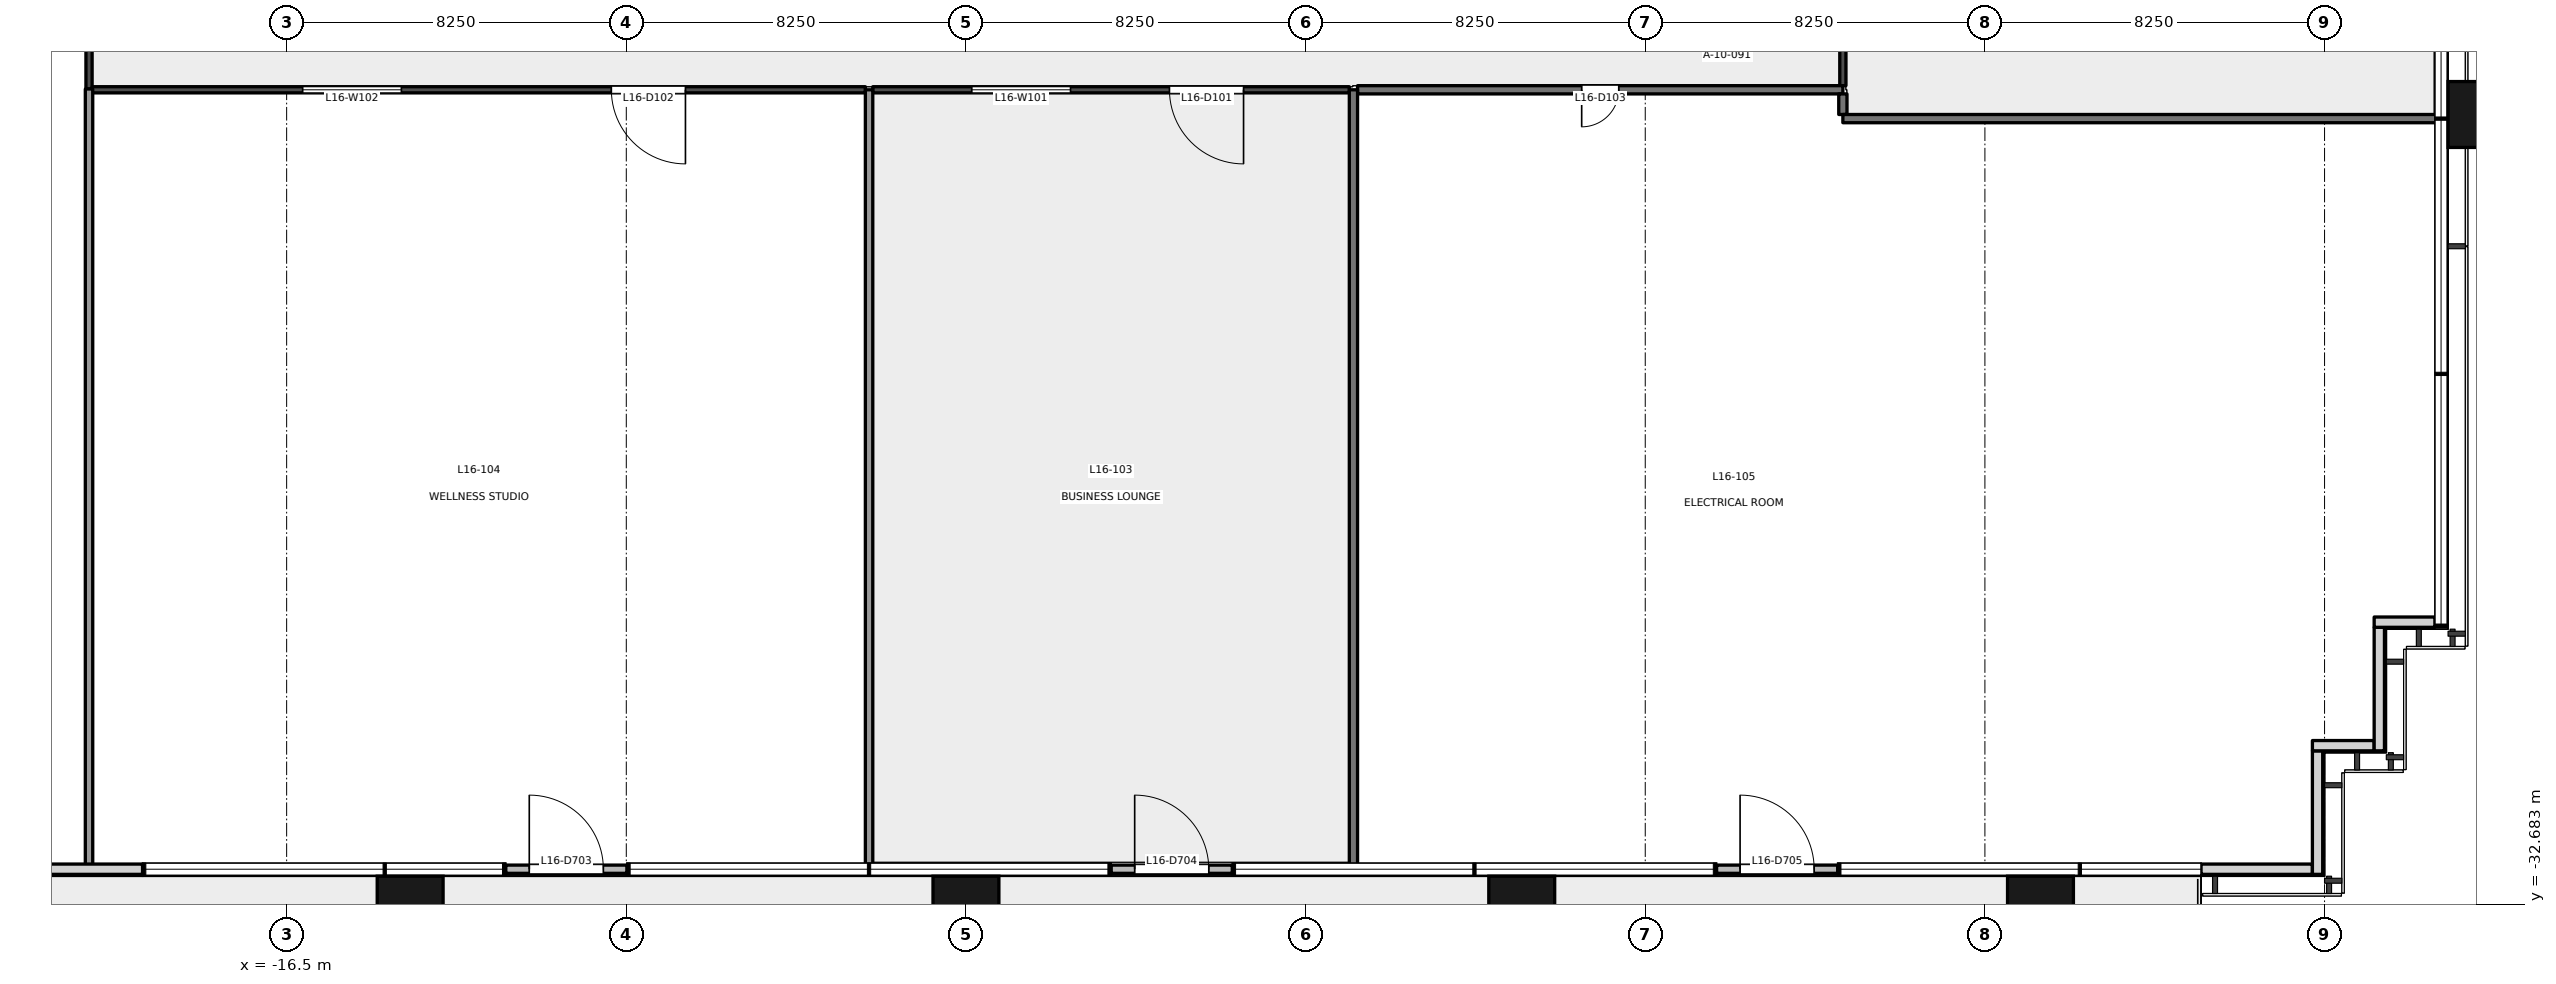
"""IFC4 building model, lengths in metres.
Left out: names, types, materials, properties, quantities, classifications, styles, units other than length and angle.
Written with IfcOpenShell. Run it as: python <this file> out.ifc"""

import sys

from ifc_helpers import new_model, si_unit, direction, frame, frame_2d, origin, origin_2d, place, context, subcontext, project, spatial, rectangle, extrude, element, fill, save


model = new_model("IFC4")
c1 = context("Model", 3, precision=1e-05, world=origin(), true_north=direction((0.0, 1.0)))
c2 = subcontext(c1, "Body", "Model", "MODEL_VIEW")
j1 = project(units=[si_unit("LENGTHUNIT", "METRE"), si_unit("PLANEANGLEUNIT", "RADIAN")], contexts=[c1])
p1 = place(None, origin())
s1 = spatial("IfcSite", under=j1, at=p1, CompositionType="ELEMENT")
p2 = place(p1, origin())
s2 = spatial("IfcBuilding", under=s1, at=p2, CompositionType="ELEMENT")
p3 = place(p2, frame((0.0, 0.0, 74.3)))
s3 = spatial("IfcBuildingStorey", under=s2, at=p3, CompositionType="ELEMENT", Elevation=74.3)
for number, where, z_axis, x_axis in (
    (1, (-13.5, -32.9, -0.2), (0.0, 0.0, 1.0), (1.0, 0.0, 0.0)),
    (2, (0.0, -32.9, -0.2), (0.0, 0.0, 1.0), (1.0, 0.0, 0.0)),
    (3, (13.5, -32.9, -0.2), (0.0, 0.0, 1.0), (1.0, 0.0, 0.0)),
    (4, (26.1, -32.9, -0.2), (0.0, 0.0, 1.0), (1.0, 0.0, 0.0)),
    (5, (36.9, -13.5, -0.2), (0.0, 0.0, 1.0), (0.0, 1.0, 0.0)),
):
    element("IfcColumn", number, at=place(p3, frame(where, z_axis=z_axis, x_axis=x_axis)), inside=s3, PredefinedType="COLUMN", context=c2, shape_type="SweptSolid", body=[
        extrude(rectangle(XDim=1.6, YDim=1.8, at=origin_2d()), origin(), (0.0, 0.0, 1.0), 5.4),
    ])
p4 = place(p3, frame((30.0, -31.83, 0.0), z_axis=(0.0, 0.0, 1.0), x_axis=(1.0, 0.0, 0.0)))
e6 = element("IfcWall", 6, at=p4, inside=s3, PredefinedType="SOLIDWALL", context=c2, shape_type="SweptSolid", body=[
    extrude(rectangle(XDim=2.705, YDim=0.25, at=frame_2d((1.353, 0.0))), origin(), (0.0, 0.0, 1.0), 5.2),
])
p5 = place(p3, frame((32.83, -31.955, 0.0), z_axis=(0.0, 0.0, 1.0), x_axis=(0.0, 1.0, 0.0)))
e7 = element("IfcWall", 7, at=p5, inside=s3, PredefinedType="SOLIDWALL", context=c2, shape_type="SweptSolid", body=[
    extrude(rectangle(XDim=3.0, YDim=0.25, at=frame_2d((1.5, 0.0))), origin(), (0.0, 0.0, 1.0), 5.2),
])
p6 = place(p3, frame((32.705, -28.83, 0.0), z_axis=(0.0, 0.0, 1.0), x_axis=(1.0, 0.0, 0.0)))
e8 = element("IfcWall", 8, at=p6, inside=s3, PredefinedType="SOLIDWALL", context=c2, shape_type="SweptSolid", body=[
    extrude(rectangle(XDim=1.5, YDim=0.25, at=frame_2d((0.75, 0.0))), origin(), (0.0, 0.0, 1.0), 5.2),
])
p7 = place(p3, frame((34.33, -28.955, 0.0), z_axis=(0.0, 0.0, 1.0), x_axis=(0.0, 1.0, 0.0)))
e9 = element("IfcWall", 9, at=p7, inside=s3, PredefinedType="SOLIDWALL", context=c2, shape_type="SweptSolid", body=[
    extrude(rectangle(XDim=3.0, YDim=0.25, at=frame_2d((1.5, 0.0))), origin(), (0.0, 0.0, 1.0), 5.2),
])
p8 = place(p3, frame((34.205, -25.83, 0.0), z_axis=(0.0, 0.0, 1.0), x_axis=(1.0, 0.0, 0.0)))
e10 = element("IfcWall", 10, at=p8, inside=s3, PredefinedType="SOLIDWALL", context=c2, shape_type="SweptSolid", body=[
    extrude(rectangle(XDim=1.475, YDim=0.25, at=frame_2d((0.737, 0.0))), origin(), (0.0, 0.0, 1.0), 5.2),
])
p9 = place(p3, frame((-22.955, -31.83, 0.0), z_axis=(0.0, 0.0, 1.0), x_axis=(1.0, 0.0, 0.0)))
e11 = element("IfcWall", 11, at=p9, inside=s3, PredefinedType="SOLIDWALL", context=c2, shape_type="SweptSolid", body=[
    extrude(rectangle(XDim=2.955, YDim=0.25, at=frame_2d((1.478, 0.0))), origin(), (0.0, 0.0, 1.0), 5.2),
])
p10 = place(p3, frame((-11.177, -31.83, 0.0), z_axis=(0.0, 0.0, 1.0), x_axis=(1.0, 0.0, 0.0)))
e12 = element("IfcWall", 12, at=p10, inside=s3, PredefinedType="SOLIDWALL", context=c2, shape_type="SweptSolid", body=[
    extrude(rectangle(XDim=2.941, YDim=0.2, at=frame_2d((1.47, 0.0))), origin(), (0.0, 0.0, 1.0), 4.1),
])
p11 = place(p10, frame((0.571, 0.0, 0.0)))
e13 = element("IfcOpeningElement", 13, at=p11, cuts=e12, PredefinedType="OPENING", context=c2, shape_type="SweptSolid", body=[
    extrude(rectangle(XDim=1.8, YDim=2.4, at=frame_2d((0.9, 1.2))), frame((0.0, 0.111, 0.0), z_axis=(0.0, -1.0, 0.0), x_axis=(1.0, 0.0, 0.0)), (0.0, 0.0, 1.0), 0.221),
])
p12 = place(p3, frame((3.528, -31.83, 0.0), z_axis=(0.0, 0.0, 1.0), x_axis=(1.0, 0.0, 0.0)))
e14 = element("IfcWall", 14, at=p12, inside=s3, PredefinedType="SOLIDWALL", context=c2, shape_type="SweptSolid", body=[
    extrude(rectangle(XDim=2.941, YDim=0.2, at=frame_2d((1.47, 0.0))), origin(), (0.0, 0.0, 1.0), 4.1),
])
p13 = place(p12, frame((0.571, 0.0, 0.0)))
e15 = element("IfcOpeningElement", 15, at=p13, cuts=e14, PredefinedType="OPENING", context=c2, shape_type="SweptSolid", body=[
    extrude(rectangle(XDim=1.8, YDim=2.4, at=frame_2d((0.9, 1.2))), frame((0.0, 0.111, 0.0), z_axis=(0.0, -1.0, 0.0), x_axis=(1.0, 0.0, 0.0)), (0.0, 0.0, 1.0), 0.221),
])
p14 = place(p3, frame((18.233, -31.83, 0.0), z_axis=(0.0, 0.0, 1.0), x_axis=(1.0, 0.0, 0.0)))
e16 = element("IfcWall", 16, at=p14, inside=s3, PredefinedType="SOLIDWALL", context=c2, shape_type="SweptSolid", body=[
    extrude(rectangle(XDim=2.941, YDim=0.2, at=frame_2d((1.471, 0.0))), origin(), (0.0, 0.0, 1.0), 4.1),
])
p15 = place(p14, frame((0.571, 0.0, 0.0)))
e17 = element("IfcOpeningElement", 17, at=p15, cuts=e16, PredefinedType="OPENING", context=c2, shape_type="SweptSolid", body=[
    extrude(rectangle(XDim=1.8, YDim=2.4, at=frame_2d((0.9, 1.2))), frame((0.0, 0.111, 0.0), z_axis=(0.0, -1.0, 0.0), x_axis=(1.0, 0.0, 0.0)), (0.0, 0.0, 1.0), 0.221),
])
p16 = place(p3, frame((-21.3, -12.88, 0.0), z_axis=(0.0, 0.0, 1.0), x_axis=(0.0, 1.0, 0.0)))
e18 = element("IfcWall", 18, at=p16, inside=s3, PredefinedType="PARTITIONING", context=c2, shape_type="SweptSolid", body=[
    extrude(rectangle(XDim=23.62, YDim=0.15, at=frame_2d((11.81, 0.0))), origin(), (0.0, 0.0, 1.0), 4.8),
])
p17 = place(p16, frame((16.24, 0.0, 0.0)))
e19 = element("IfcOpeningElement", 19, at=p17, cuts=e18, PredefinedType="OPENING", context=c2, shape_type="SweptSolid", body=[
    extrude(rectangle(XDim=1.8, YDim=2.1, at=frame_2d((0.9, 1.05))), frame((0.0, 0.085, 0.0), z_axis=(0.0, -1.0, 0.0), x_axis=(1.0, 0.0, 0.0)), (0.0, 0.0, 1.0), 0.171),
])
p18 = place(p16, frame((6.948, 0.0, 0.0)))
e20 = element("IfcOpeningElement", 20, at=p18, cuts=e18, PredefinedType="OPENING", context=c2, shape_type="SweptSolid", body=[
    extrude(rectangle(XDim=2.4, YDim=2.4, at=frame_2d((1.2, 1.2))), frame((0.0, 0.085, 0.0), z_axis=(0.0, -1.0, 0.0), x_axis=(1.0, 0.0, 0.0)), (0.0, 0.0, 1.0), 0.171),
])
p19 = place(p3, frame((9.312, -12.9, 0.0), z_axis=(0.0, 0.0, 1.0), x_axis=(-1.0, 0.0, 0.0)))
e21 = element("IfcWall", 21, at=p19, inside=s3, PredefinedType="PARTITIONING", context=c2, shape_type="SweptSolid", body=[
    extrude(rectangle(XDim=11.575, YDim=0.15, at=frame_2d((5.788, 0.0))), origin(), (0.0, 0.0, 1.0), 4.2),
])
p20 = place(p19, frame((2.569, 0.0, 0.0)))
e22 = element("IfcOpeningElement", 22, at=p20, cuts=e21, PredefinedType="OPENING", context=c2, shape_type="SweptSolid", body=[
    extrude(rectangle(XDim=1.8, YDim=2.1, at=frame_2d((0.9, 1.05))), frame((0.0, 0.085, 0.0), z_axis=(0.0, -1.0, 0.0), x_axis=(1.0, 0.0, 0.0)), (0.0, 0.0, 1.0), 0.171),
])
p21 = place(p19, frame((6.772, 0.0, 0.0)))
e23 = element("IfcOpeningElement", 23, at=p21, cuts=e21, PredefinedType="OPENING", context=c2, shape_type="SweptSolid", body=[
    extrude(rectangle(XDim=2.4, YDim=2.4, at=frame_2d((1.2, 1.2))), frame((0.0, 0.085, 0.0), z_axis=(0.0, -1.0, 0.0), x_axis=(1.0, 0.0, 0.0)), (0.0, 0.0, 1.0), 0.171),
])
p22 = place(p3, frame((-2.443, -12.9, 0.0), z_axis=(0.0, 0.0, 1.0), x_axis=(-1.0, 0.0, 0.0)))
e24 = element("IfcWall", 24, at=p22, inside=s3, PredefinedType="PARTITIONING", context=c2, shape_type="SweptSolid", body=[
    extrude(rectangle(XDim=18.782, YDim=0.15, at=frame_2d((9.391, 0.0))), origin(), (0.0, 0.0, 1.0), 4.2),
])
p23 = place(p22, frame((4.37, 0.0, 0.0)))
e25 = element("IfcOpeningElement", 25, at=p23, cuts=e24, PredefinedType="OPENING", context=c2, shape_type="SweptSolid", body=[
    extrude(rectangle(XDim=1.8, YDim=2.1, at=frame_2d((0.9, 1.05))), frame((0.0, 0.085, 0.0), z_axis=(0.0, -1.0, 0.0), x_axis=(1.0, 0.0, 0.0)), (0.0, 0.0, 1.0), 0.171),
])
p24 = place(p22, frame((11.269, 0.0, 0.0)))
e26 = element("IfcOpeningElement", 26, at=p24, cuts=e24, PredefinedType="OPENING", context=c2, shape_type="SweptSolid", body=[
    extrude(rectangle(XDim=2.4, YDim=2.4, at=frame_2d((1.2, 1.2))), frame((0.0, 0.085, 0.0), z_axis=(0.0, -1.0, 0.0), x_axis=(1.0, 0.0, 0.0)), (0.0, 0.0, 1.0), 0.171),
])
p25 = place(p3, frame((21.3, -12.9, 0.0), z_axis=(0.0, 0.0, 1.0), x_axis=(-1.0, 0.0, 0.0)))
e27 = element("IfcWall", 27, at=p25, inside=s3, PredefinedType="PARTITIONING", context=c2, shape_type="SweptSolid", body=[
    extrude(rectangle(XDim=11.788, YDim=0.2, at=frame_2d((5.894, 0.0))), origin(), (0.0, 0.0, 1.0), 3.8),
])
p26 = place(p25, frame((5.444, 0.0, 0.0)))
e28 = element("IfcOpeningElement", 28, at=p26, cuts=e27, PredefinedType="OPENING", context=c2, shape_type="SweptSolid", body=[
    extrude(rectangle(XDim=0.9, YDim=2.1, at=frame_2d((0.45, 1.05))), frame((0.0, 0.111, 0.0), z_axis=(0.0, -1.0, 0.0), x_axis=(1.0, 0.0, 0.0)), (0.0, 0.0, 1.0), 0.221),
])
p27 = place(p3, frame((21.3, -4.4, 0.0), z_axis=(0.0, 0.0, 1.0), x_axis=(0.0, -1.0, 0.0)))
e29 = element("IfcWall", 29, at=p27, inside=s3, PredefinedType="PARTITIONING", context=c2, shape_type="SweptSolid", body=[
    extrude(rectangle(XDim=8.4, YDim=0.15, at=frame_2d((4.2, 0.0))), origin(), (0.0, 0.0, 1.0), 4.3),
])
p28 = place(p27, frame((1.775, 0.0, 0.0)))
e30 = element("IfcOpeningElement", 30, at=p28, cuts=e29, PredefinedType="OPENING", context=c2, shape_type="SweptSolid", body=[
    extrude(rectangle(XDim=1.8, YDim=2.1, at=frame_2d((0.9, 1.05))), frame((0.0, 0.085, 0.0), z_axis=(0.0, -1.0, 0.0), x_axis=(1.0, 0.0, 0.0)), (0.0, 0.0, 1.0), 0.171),
])
p29 = place(p27, frame((4.787, 0.0, 0.0)))
e31 = element("IfcOpeningElement", 31, at=p29, cuts=e29, PredefinedType="OPENING", context=c2, shape_type="SweptSolid", body=[
    extrude(rectangle(XDim=2.4, YDim=2.4, at=frame_2d((1.2, 1.2))), frame((0.0, 0.085, 0.0), z_axis=(0.0, -1.0, 0.0), x_axis=(1.0, 0.0, 0.0)), (0.0, 0.0, 1.0), 0.171),
])
p30 = place(p3, frame((-21.3, -12.88, 0.0), z_axis=(0.0, 0.0, 1.0), x_axis=(0.0, -1.0, 0.0)))
e32 = element("IfcWall", 32, at=p30, inside=s3, PredefinedType="PARTITIONING", context=c2, shape_type="SweptSolid", body=[
    extrude(rectangle(XDim=18.86, YDim=0.18, at=frame_2d((9.43, 0.0))), origin(), (0.0, 0.0, 1.0), 5.2),
])
p31 = place(p3, frame((-2.353, -31.74, 0.0), z_axis=(0.0, 0.0, 1.0), x_axis=(0.0, 1.0, 0.0)))
e33 = element("IfcWall", 33, at=p31, inside=s3, PredefinedType="PARTITIONING", context=c2, shape_type="SweptSolid", body=[
    extrude(rectangle(XDim=18.84, YDim=0.18, at=frame_2d((9.42, 0.0))), origin(), (0.0, 0.0, 1.0), 5.2),
])
p32 = place(p3, frame((9.412, -12.9, 0.0), z_axis=(0.0, 0.0, 1.0), x_axis=(0.0, -1.0, 0.0)))
e34 = element("IfcWall", 34, at=p32, inside=s3, PredefinedType="PARTITIONING", context=c2, shape_type="SweptSolid", body=[
    extrude(rectangle(XDim=18.84, YDim=0.2, at=frame_2d((9.42, 0.0))), origin(), (0.0, 0.0, 1.0), 5.2),
])
p33 = place(p3, frame((21.3, -13.0, 0.0), z_axis=(0.0, 0.0, 1.0), x_axis=(0.0, -1.0, 0.0)))
e35 = element("IfcWall", 35, at=p33, inside=s3, PredefinedType="PARTITIONING", context=c2, shape_type="SweptSolid", body=[
    extrude(rectangle(XDim=0.5, YDim=0.2, at=frame_2d((0.25, 0.0))), origin(), (0.0, 0.0, 1.0), 4.3),
])
p34 = place(p3, frame((21.3, -13.6, 0.0), z_axis=(0.0, 0.0, 1.0), x_axis=(1.0, 0.0, 0.0)))
e36 = element("IfcWall", 36, at=p34, inside=s3, PredefinedType="PARTITIONING", context=c2, shape_type="SweptSolid", body=[
    extrude(rectangle(XDim=14.44, YDim=0.2, at=frame_2d((7.22, 0.0))), origin(), (0.0, 0.0, 1.0), 4.3),
])
p35 = place(p11, origin())
e37 = element("IfcDoor", 37, at=p35, inside=s3, OperationType="DOUBLE_DOOR_SINGLE_SWING", PredefinedType="DOOR", context=c2, shape_type="SweptSolid", body=[
    extrude(rectangle(XDim=1.8, YDim=2.4, at=frame_2d((0.9, 1.2))), frame((0.0, 0.025, 0.0), z_axis=(0.0, -1.0, 0.0), x_axis=(1.0, 0.0, 0.0)), (0.0, 0.0, 1.0), 0.05),
])
fill(e13, e37)
p36 = place(p13, origin())
e38 = element("IfcDoor", 38, at=p36, inside=s3, OperationType="DOUBLE_DOOR_SINGLE_SWING", PredefinedType="DOOR", context=c2, shape_type="SweptSolid", body=[
    extrude(rectangle(XDim=1.8, YDim=2.4, at=frame_2d((0.9, 1.2))), frame((0.0, 0.025, 0.0), z_axis=(0.0, -1.0, 0.0), x_axis=(1.0, 0.0, 0.0)), (0.0, 0.0, 1.0), 0.05),
])
fill(e15, e38)
p37 = place(p15, origin())
e39 = element("IfcDoor", 39, at=p37, inside=s3, OperationType="DOUBLE_DOOR_SINGLE_SWING", PredefinedType="DOOR", context=c2, shape_type="SweptSolid", body=[
    extrude(rectangle(XDim=1.8, YDim=2.4, at=frame_2d((0.9, 1.2))), frame((0.0, 0.025, 0.0), z_axis=(0.0, -1.0, 0.0), x_axis=(1.0, 0.0, 0.0)), (0.0, 0.0, 1.0), 0.05),
])
fill(e17, e39)
p38 = place(p20, origin())
e40 = element("IfcDoor", 40, at=p38, inside=s3, OperationType="DOUBLE_DOOR_SINGLE_SWING", PredefinedType="DOOR", context=c2, shape_type="SweptSolid", body=[
    extrude(rectangle(XDim=1.8, YDim=2.1, at=frame_2d((0.9, 1.05))), frame((0.0, 0.025, 0.0), z_axis=(0.0, -1.0, 0.0), x_axis=(1.0, 0.0, 0.0)), (0.0, 0.0, 1.0), 0.05),
])
fill(e22, e40)
p39 = place(p23, origin())
e41 = element("IfcDoor", 41, at=p39, inside=s3, OperationType="DOUBLE_DOOR_SINGLE_SWING", PredefinedType="DOOR", context=c2, shape_type="SweptSolid", body=[
    extrude(rectangle(XDim=1.8, YDim=2.1, at=frame_2d((0.9, 1.05))), frame((0.0, 0.025, 0.0), z_axis=(0.0, -1.0, 0.0), x_axis=(1.0, 0.0, 0.0)), (0.0, 0.0, 1.0), 0.05),
])
fill(e25, e41)
p40 = place(p26, origin())
e42 = element("IfcDoor", 42, at=p40, inside=s3, OperationType="SINGLE_SWING_RIGHT", PredefinedType="DOOR", context=c2, shape_type="SweptSolid", body=[
    extrude(rectangle(XDim=0.9, YDim=2.1, at=frame_2d((0.45, 1.05))), frame((0.0, 0.025, 0.0), z_axis=(0.0, -1.0, 0.0), x_axis=(1.0, 0.0, 0.0)), (0.0, 0.0, 1.0), 0.05),
])
fill(e28, e42)
p41 = place(p21, origin())
e43 = element("IfcWindow", 43, at=p41, inside=s3, PartitioningType="SINGLE_PANEL", PredefinedType="WINDOW", context=c2, shape_type="SweptSolid", body=[
    extrude(rectangle(XDim=2.4, YDim=2.4, at=frame_2d((1.2, 1.2))), frame((0.0, 0.03, 0.0), z_axis=(0.0, -1.0, 0.0), x_axis=(1.0, 0.0, 0.0)), (0.0, 0.0, 1.0), 0.06),
])
fill(e23, e43)
p42 = place(p24, origin())
e44 = element("IfcWindow", 44, at=p42, inside=s3, PartitioningType="SINGLE_PANEL", PredefinedType="WINDOW", context=c2, shape_type="SweptSolid", body=[
    extrude(rectangle(XDim=2.4, YDim=2.4, at=frame_2d((1.2, 1.2))), frame((0.0, 0.03, 0.0), z_axis=(0.0, -1.0, 0.0), x_axis=(1.0, 0.0, 0.0)), (0.0, 0.0, 1.0), 0.06),
])
fill(e26, e44)
save(model, sys.argv[1])
